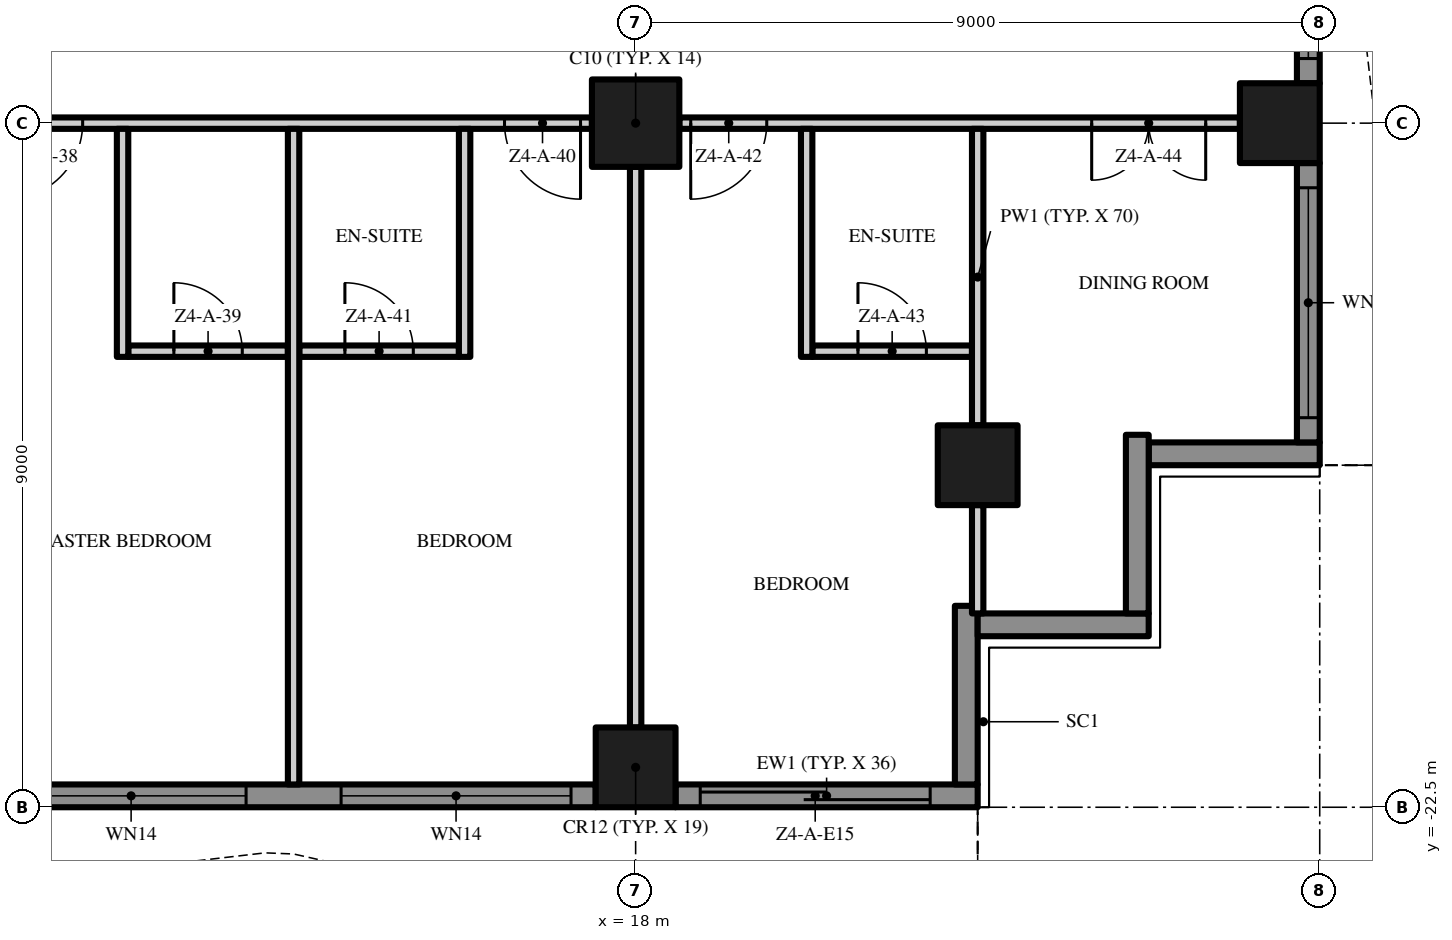
"""IFC4 building model, lengths in metres.
Left out: names, types, materials, properties, quantities, classifications, styles, units other than length and angle.
Written with IfcOpenShell. Run it as: python <this file> out.ifc"""

import sys

from ifc_helpers import new_model, si_unit, direction, frame, frame_2d, origin, origin_2d, place, context, subcontext, project, spatial, polyline, rectangle, outline, extrude, element, fill, save


model = new_model("IFC4")
c1 = context("Model", 3, precision=1e-05, world=origin(), true_north=direction((0.0, 1.0)))
c2 = subcontext(c1, "Body", "Model", "MODEL_VIEW")
j1 = project(units=[si_unit("LENGTHUNIT", "METRE"), si_unit("PLANEANGLEUNIT", "RADIAN")], contexts=[c1])
p1 = place(None, origin())
s1 = spatial("IfcSite", under=j1, at=p1, CompositionType="ELEMENT")
p2 = place(p1, origin())
s2 = spatial("IfcBuilding", under=s1, at=p2, CompositionType="ELEMENT")
p3 = place(p2, frame((0.0, 0.0, 192.0)))
s3 = spatial("IfcBuildingStorey", under=s2, at=p3, CompositionType="ELEMENT", Elevation=192.0)
p4 = place(p3, frame((18.0, -13.5, 0.0), z_axis=(0.0, 0.0, 1.0), x_axis=(1.0, 0.0, 0.0)))
e1 = element("IfcColumn", 1, at=p4, inside=s3, PredefinedType="COLUMN", context=c2, shape_type="SweptSolid", body=[
    extrude(rectangle(XDim=1.15, YDim=1.15, at=origin_2d()), origin(), (0.0, 0.0, 1.0), 3.5),
])
for number, where, z_axis, x_axis in (
    (2, (18.0, -21.975, 0.0), (0.0, 0.0, 1.0), (1.0, 0.0, 0.0)),
    (3, (26.475, -13.5, 0.0), (0.0, 0.0, 1.0), (1.0, 0.0, 0.0)),
    (4, (22.5, -18.0, 0.0), (0.0, 0.0, 1.0), (1.0, 0.0, 0.0)),
):
    element("IfcColumn", number, at=place(p3, frame(where, z_axis=z_axis, x_axis=x_axis)), inside=s3, PredefinedType="COLUMN", context=c2, shape_type="SweptSolid", body=[
        extrude(rectangle(XDim=1.05, YDim=1.05, at=origin_2d()), origin(), (0.0, 0.0, 1.0), 3.5),
    ])
p5 = place(p3, frame((17.475, -22.35, 0.0), z_axis=(0.0, 0.0, 1.0), x_axis=(-1.0, 0.0, 0.0)))
e5 = element("IfcWall", 5, at=p5, inside=s3, PredefinedType="SOLIDWALL", context=c2, shape_type="SweptSolid", body=[
    extrude(rectangle(XDim=7.95, YDim=0.3, at=frame_2d((3.975, 0.0))), origin(), (0.0, 0.0, 1.0), 3.5),
])
p6 = place(p5, frame((4.6, 0.0, 0.45)))
e6 = element("IfcOpeningElement", 6, at=p6, cuts=e5, PredefinedType="OPENING", context=c2, shape_type="SweptSolid", body=[
    extrude(rectangle(XDim=3.025, YDim=2.65, at=frame_2d((1.512, 1.325))), frame((0.0, 0.16, 0.0), z_axis=(0.0, -1.0, 0.0), x_axis=(1.0, 0.0, 0.0)), (0.0, 0.0, 1.0), 0.32),
])
p7 = place(p5, frame((0.325, 0.0, 0.45)))
e7 = element("IfcOpeningElement", 7, at=p7, cuts=e5, PredefinedType="OPENING", context=c2, shape_type="SweptSolid", body=[
    extrude(rectangle(XDim=3.025, YDim=2.65, at=frame_2d((1.512, 1.325))), frame((0.0, 0.16, 0.0), z_axis=(0.0, -1.0, 0.0), x_axis=(1.0, 0.0, 0.0)), (0.0, 0.0, 1.0), 0.32),
])
p8 = place(p3, frame((22.5, -22.35, 0.0), z_axis=(0.0, 0.0, 1.0), x_axis=(-1.0, 0.0, 0.0)))
e8 = element("IfcWall", 8, at=p8, inside=s3, PredefinedType="SOLIDWALL", context=c2, shape_type="SweptSolid", body=[
    extrude(rectangle(XDim=3.975, YDim=0.3, at=frame_2d((1.988, 0.0))), origin(), (0.0, 0.0, 1.0), 3.5),
])
p9 = place(p8, frame((0.625, 0.0, 0.0)))
e9 = element("IfcOpeningElement", 9, at=p9, cuts=e8, PredefinedType="OPENING", context=c2, shape_type="SweptSolid", body=[
    extrude(rectangle(XDim=3.025, YDim=2.4, at=frame_2d((1.512, 1.2))), frame((0.0, 0.16, 0.0), z_axis=(0.0, -1.0, 0.0), x_axis=(1.0, 0.0, 0.0)), (0.0, 0.0, 1.0), 0.32),
])
p10 = place(p3, frame((22.35, -19.85, 0.0), z_axis=(0.0, 0.0, 1.0), x_axis=(0.0, -1.0, 0.0)))
e10 = element("IfcWall", 10, at=p10, inside=s3, PredefinedType="SOLIDWALL", context=c2, shape_type="SweptSolid", body=[
    extrude(rectangle(XDim=2.35, YDim=0.3, at=frame_2d((1.175, 0.0))), origin(), (0.0, 0.0, 1.0), 3.5),
])
p11 = place(p3, frame((24.75, -20.1, 0.0), z_axis=(0.0, 0.0, 1.0), x_axis=(-1.0, 0.0, 0.0)))
e11 = element("IfcWall", 11, at=p11, inside=s3, PredefinedType="SOLIDWALL", context=c2, shape_type="SweptSolid", body=[
    extrude(rectangle(XDim=2.25, YDim=0.3, at=frame_2d((1.125, 0.0))), origin(), (0.0, 0.0, 1.0), 3.5),
])
p12 = place(p3, frame((24.6, -17.6, 0.0), z_axis=(0.0, 0.0, 1.0), x_axis=(0.0, -1.0, 0.0)))
e12 = element("IfcWall", 12, at=p12, inside=s3, PredefinedType="SOLIDWALL", context=c2, shape_type="SweptSolid", body=[
    extrude(rectangle(XDim=2.35, YDim=0.3, at=frame_2d((1.175, 0.0))), origin(), (0.0, 0.0, 1.0), 3.5),
])
p13 = place(p3, frame((27.0, -17.85, 0.0), z_axis=(0.0, 0.0, 1.0), x_axis=(-1.0, 0.0, 0.0)))
e13 = element("IfcWall", 13, at=p13, inside=s3, PredefinedType="SOLIDWALL", context=c2, shape_type="SweptSolid", body=[
    extrude(rectangle(XDim=2.25, YDim=0.3, at=frame_2d((1.125, 0.0))), origin(), (0.0, 0.0, 1.0), 3.5),
])
p14 = place(p3, frame((26.85, -14.025, 0.0), z_axis=(0.0, 0.0, 1.0), x_axis=(0.0, -1.0, 0.0)))
e14 = element("IfcWall", 14, at=p14, inside=s3, PredefinedType="SOLIDWALL", context=c2, shape_type="SweptSolid", body=[
    extrude(rectangle(XDim=3.675, YDim=0.3, at=frame_2d((1.837, 0.0))), origin(), (0.0, 0.0, 1.0), 3.5),
])
p15 = place(p14, frame((0.325, 0.0, 0.45)))
e15 = element("IfcOpeningElement", 15, at=p15, cuts=e14, PredefinedType="OPENING", context=c2, shape_type="SweptSolid", body=[
    extrude(rectangle(XDim=3.025, YDim=2.65, at=frame_2d((1.512, 1.325))), frame((0.0, 0.16, 0.0), z_axis=(0.0, -1.0, 0.0), x_axis=(1.0, 0.0, 0.0)), (0.0, 0.0, 1.0), 0.32),
])
p16 = place(p3, frame((26.85, -5.025, 0.0), z_axis=(0.0, 0.0, 1.0), x_axis=(0.0, -1.0, 0.0)))
e16 = element("IfcWall", 16, at=p16, inside=s3, PredefinedType="SOLIDWALL", context=c2, shape_type="SweptSolid", body=[
    extrude(rectangle(XDim=7.95, YDim=0.3, at=frame_2d((3.975, 0.0))), origin(), (0.0, 0.0, 1.0), 3.5),
])
p17 = place(p16, frame((4.6, 0.0, 0.45)))
e17 = element("IfcOpeningElement", 17, at=p17, cuts=e16, PredefinedType="OPENING", context=c2, shape_type="SweptSolid", body=[
    extrude(rectangle(XDim=3.025, YDim=2.65, at=frame_2d((1.512, 1.325))), frame((0.0, 0.16, 0.0), z_axis=(0.0, -1.0, 0.0), x_axis=(1.0, 0.0, 0.0)), (0.0, 0.0, 1.0), 0.32),
])
p18 = place(p16, frame((0.325, 0.0, 0.0)))
e18 = element("IfcOpeningElement", 18, at=p18, cuts=e16, PredefinedType="OPENING", context=c2, shape_type="SweptSolid", body=[
    extrude(rectangle(XDim=3.025, YDim=2.4, at=frame_2d((1.512, 1.2))), frame((0.0, 0.16, 0.0), z_axis=(0.0, -1.0, 0.0), x_axis=(1.0, 0.0, 0.0)), (0.0, 0.0, 1.0), 0.32),
])
p19 = place(p3, origin())
e19 = element("IfcWall", 19, at=p19, inside=s3, PredefinedType="USERDEFINED", context=c2, shape_type="SweptSolid", body=[
    extrude(outline(polyline([(-22.5, -25.149), (-21.0, -24.488), (-19.5, -23.755), (-18.0, -23.231), (-16.875, -23.1), (-16.5, -23.115), (-15.0, -23.451), (-13.5, -24.112), (-12.0, -24.845), (-10.5, -25.369), (-9.375, -25.5), (-9.0, -25.485), (-7.5, -25.149), (-6.0, -24.488), (-4.5, -23.755), (-3.0, -23.231), (-1.875, -23.1), (-1.5, -23.115), (0.0, -23.451), (1.5, -24.112), (3.0, -24.845), (4.5, -25.369), (5.625, -25.5), (6.0, -25.485), (7.5, -25.149), (9.0, -24.488), (10.5, -23.755), (12.0, -23.231), (13.125, -23.1), (13.5, -23.115), (15.0, -23.451), (16.5, -24.112), (18.0, -24.845), (19.5, -25.369), (20.625, -25.5), (21.0, -25.485), (22.5, -25.149), (22.445, -24.905), (20.967, -25.236), (20.635, -25.249), (19.556, -25.124), (18.096, -24.614), (16.605, -23.885), (15.079, -23.213), (13.533, -22.866), (13.115, -22.849), (11.944, -22.986), (10.404, -23.524), (8.895, -24.261), (7.421, -24.91), (5.967, -25.236), (5.635, -25.249), (4.556, -25.124), (3.096, -24.614), (1.605, -23.885), (0.079, -23.213), (-1.467, -22.866), (-1.885, -22.849), (-3.056, -22.986), (-4.596, -23.524), (-6.105, -24.261), (-7.579, -24.91), (-9.033, -25.236), (-9.365, -25.249), (-10.444, -25.124), (-11.904, -24.614), (-13.395, -23.885), (-14.921, -23.213), (-16.467, -22.866), (-16.885, -22.849), (-18.056, -22.986), (-19.596, -23.524), (-21.105, -24.261), (-22.601, -24.92), (-22.5, -25.149)])), origin(), (0.0, 0.0, 1.0), 0.9),
])
p20 = place(p3, origin())
e20 = element("IfcWall", 20, at=p20, inside=s3, PredefinedType="USERDEFINED", context=c2, shape_type="SweptSolid", body=[
    extrude(outline(polyline([(29.649, -18.0), (28.988, -16.5), (28.255, -15.0), (27.731, -13.5), (27.6, -12.375), (27.615, -12.0), (27.951, -10.5), (28.612, -9.0), (29.345, -7.5), (29.869, -6.0), (30.0, -4.875), (29.985, -4.5), (29.649, -3.0), (28.988, -1.5), (28.255, 0.0), (27.731, 1.5), (27.6, 2.625), (27.615, 3.0), (27.951, 4.5), (28.612, 6.0), (29.345, 7.5), (29.869, 9.0), (30.0, 10.125), (29.985, 10.5), (29.649, 12.0), (28.988, 13.5), (28.255, 15.0), (27.731, 16.5), (27.6, 17.625), (27.615, 18.0), (27.365, 18.01), (27.349, 17.615), (27.486, 16.444), (28.024, 14.904), (28.761, 13.395), (29.41, 11.921), (29.736, 10.467), (29.749, 10.135), (29.624, 9.056), (29.114, 7.596), (28.385, 6.105), (27.713, 4.579), (27.366, 3.033), (27.349, 2.615), (27.486, 1.444), (28.024, -0.096), (28.761, -1.605), (29.41, -3.079), (29.736, -4.533), (29.749, -4.865), (29.624, -5.944), (29.114, -7.404), (28.385, -8.895), (27.713, -10.421), (27.366, -11.967), (27.349, -12.385), (27.486, -13.556), (28.024, -15.096), (28.761, -16.605), (29.42, -18.101), (29.649, -18.0)])), origin(), (0.0, 0.0, 1.0), 0.9),
])
p21 = place(p3, frame((11.325, -16.5, 0.0), z_axis=(0.0, 0.0, 1.0), x_axis=(1.0, 0.0, 0.0)))
e21 = element("IfcWall", 21, at=p21, inside=s3, PredefinedType="PARTITIONING", context=c2, shape_type="SweptSolid", body=[
    extrude(rectangle(XDim=2.1, YDim=0.15, at=frame_2d((1.05, 0.0))), origin(), (0.0, 0.0, 1.0), 3.5),
])
p22 = place(p21, frame((0.6, 0.0, 0.0)))
e22 = element("IfcOpeningElement", 22, at=p22, cuts=e21, PredefinedType="OPENING", context=c2, shape_type="SweptSolid", body=[
    extrude(rectangle(XDim=0.9, YDim=2.1, at=frame_2d((0.45, 1.05))), frame((0.0, 0.085, 0.0), z_axis=(0.0, -1.0, 0.0), x_axis=(1.0, 0.0, 0.0)), (0.0, 0.0, 1.0), 0.17),
])
p23 = place(p3, frame((13.575, -16.5, 0.0), z_axis=(0.0, 0.0, 1.0), x_axis=(1.0, 0.0, 0.0)))
e23 = element("IfcWall", 23, at=p23, inside=s3, PredefinedType="PARTITIONING", context=c2, shape_type="SweptSolid", body=[
    extrude(rectangle(XDim=2.1, YDim=0.15, at=frame_2d((1.05, 0.0))), origin(), (0.0, 0.0, 1.0), 3.5),
])
p24 = place(p23, frame((0.6, 0.0, 0.0)))
e24 = element("IfcOpeningElement", 24, at=p24, cuts=e23, PredefinedType="OPENING", context=c2, shape_type="SweptSolid", body=[
    extrude(rectangle(XDim=0.9, YDim=2.1, at=frame_2d((0.45, 1.05))), frame((0.0, 0.085, 0.0), z_axis=(0.0, -1.0, 0.0), x_axis=(1.0, 0.0, 0.0)), (0.0, 0.0, 1.0), 0.17),
])
p25 = place(p3, frame((20.325, -16.5, 0.0), z_axis=(0.0, 0.0, 1.0), x_axis=(1.0, 0.0, 0.0)))
e25 = element("IfcWall", 25, at=p25, inside=s3, PredefinedType="PARTITIONING", context=c2, shape_type="SweptSolid", body=[
    extrude(rectangle(XDim=2.1, YDim=0.15, at=frame_2d((1.05, 0.0))), origin(), (0.0, 0.0, 1.0), 3.5),
])
p26 = place(p25, frame((0.6, 0.0, 0.0)))
e26 = element("IfcOpeningElement", 26, at=p26, cuts=e25, PredefinedType="OPENING", context=c2, shape_type="SweptSolid", body=[
    extrude(rectangle(XDim=0.9, YDim=2.1, at=frame_2d((0.45, 1.05))), frame((0.0, 0.085, 0.0), z_axis=(0.0, -1.0, 0.0), x_axis=(1.0, 0.0, 0.0)), (0.0, 0.0, 1.0), 0.17),
])
p27 = place(p3, frame((17.425, -13.5, 0.0), z_axis=(0.0, 0.0, 1.0), x_axis=(-1.0, 0.0, 0.0)))
e27 = element("IfcWall", 27, at=p27, inside=s3, PredefinedType="PARTITIONING", context=c2, shape_type="SweptSolid", body=[
    extrude(rectangle(XDim=7.85, YDim=0.15, at=frame_2d((3.925, 0.0))), origin(), (0.0, 0.0, 1.0), 3.5),
])
p28 = place(p27, frame((6.7, 0.0, 0.0)))
e28 = element("IfcOpeningElement", 28, at=p28, cuts=e27, PredefinedType="OPENING", context=c2, shape_type="SweptSolid", body=[
    extrude(rectangle(XDim=1.0, YDim=2.4, at=frame_2d((0.5, 1.2))), frame((0.0, 0.085, 0.0), z_axis=(0.0, -1.0, 0.0), x_axis=(1.0, 0.0, 0.0)), (0.0, 0.0, 1.0), 0.17),
])
p29 = place(p27, frame((0.15, 0.0, 0.0)))
e29 = element("IfcOpeningElement", 29, at=p29, cuts=e27, PredefinedType="OPENING", context=c2, shape_type="SweptSolid", body=[
    extrude(rectangle(XDim=1.0, YDim=2.4, at=frame_2d((0.5, 1.2))), frame((0.0, 0.085, 0.0), z_axis=(0.0, -1.0, 0.0), x_axis=(1.0, 0.0, 0.0)), (0.0, 0.0, 1.0), 0.17),
])
p30 = place(p3, frame((25.95, -13.5, 0.0), z_axis=(0.0, 0.0, 1.0), x_axis=(-1.0, 0.0, 0.0)))
e30 = element("IfcWall", 30, at=p30, inside=s3, PredefinedType="PARTITIONING", context=c2, shape_type="SweptSolid", body=[
    extrude(rectangle(XDim=7.375, YDim=0.15, at=frame_2d((3.688, 0.0))), origin(), (0.0, 0.0, 1.0), 3.5),
])
p31 = place(p30, frame((6.225, 0.0, 0.0)))
e31 = element("IfcOpeningElement", 31, at=p31, cuts=e30, PredefinedType="OPENING", context=c2, shape_type="SweptSolid", body=[
    extrude(rectangle(XDim=1.0, YDim=2.4, at=frame_2d((0.5, 1.2))), frame((0.0, 0.085, 0.0), z_axis=(0.0, -1.0, 0.0), x_axis=(1.0, 0.0, 0.0)), (0.0, 0.0, 1.0), 0.17),
])
p32 = place(p30, frame((0.45, 0.0, 0.0)))
e32 = element("IfcOpeningElement", 32, at=p32, cuts=e30, PredefinedType="OPENING", context=c2, shape_type="SweptSolid", body=[
    extrude(rectangle(XDim=1.5, YDim=2.4, at=frame_2d((0.75, 1.2))), frame((0.0, 0.085, 0.0), z_axis=(0.0, -1.0, 0.0), x_axis=(1.0, 0.0, 0.0)), (0.0, 0.0, 1.0), 0.17),
])
p33 = place(p3, frame((11.25, -16.575, 0.0), z_axis=(0.0, 0.0, 1.0), x_axis=(0.0, 1.0, 0.0)))
e33 = element("IfcWall", 33, at=p33, inside=s3, PredefinedType="PARTITIONING", context=c2, shape_type="SweptSolid", body=[
    extrude(rectangle(XDim=3.0, YDim=0.15, at=frame_2d((1.5, 0.0))), origin(), (0.0, 0.0, 1.0), 3.5),
])
p34 = place(p3, frame((13.5, -22.2, 0.0), z_axis=(0.0, 0.0, 1.0), x_axis=(0.0, 1.0, 0.0)))
e34 = element("IfcWall", 34, at=p34, inside=s3, PredefinedType="PARTITIONING", context=c2, shape_type="SweptSolid", body=[
    extrude(rectangle(XDim=8.625, YDim=0.15, at=frame_2d((4.312, 0.0))), origin(), (0.0, 0.0, 1.0), 3.5),
])
p35 = place(p3, frame((15.75, -16.575, 0.0), z_axis=(0.0, 0.0, 1.0), x_axis=(0.0, 1.0, 0.0)))
e35 = element("IfcWall", 35, at=p35, inside=s3, PredefinedType="PARTITIONING", context=c2, shape_type="SweptSolid", body=[
    extrude(rectangle(XDim=3.0, YDim=0.15, at=frame_2d((1.5, 0.0))), origin(), (0.0, 0.0, 1.0), 3.5),
])
p36 = place(p3, frame((18.0, -21.45, 0.0), z_axis=(0.0, 0.0, 1.0), x_axis=(0.0, 1.0, 0.0)))
e36 = element("IfcWall", 36, at=p36, inside=s3, PredefinedType="PARTITIONING", context=c2, shape_type="SweptSolid", body=[
    extrude(rectangle(XDim=7.375, YDim=0.15, at=frame_2d((3.688, 0.0))), origin(), (0.0, 0.0, 1.0), 3.5),
])
p37 = place(p3, frame((20.25, -16.575, 0.0), z_axis=(0.0, 0.0, 1.0), x_axis=(0.0, 1.0, 0.0)))
e37 = element("IfcWall", 37, at=p37, inside=s3, PredefinedType="PARTITIONING", context=c2, shape_type="SweptSolid", body=[
    extrude(rectangle(XDim=3.0, YDim=0.15, at=frame_2d((1.5, 0.0))), origin(), (0.0, 0.0, 1.0), 3.5),
])
p38 = place(p3, frame((22.5, -19.95, 0.0), z_axis=(0.0, 0.0, 1.0), x_axis=(0.0, 1.0, 0.0)))
e38 = element("IfcWall", 38, at=p38, inside=s3, PredefinedType="PARTITIONING", context=c2, shape_type="SweptSolid", body=[
    extrude(rectangle(XDim=1.425, YDim=0.15, at=frame_2d((0.713, 0.0))), origin(), (0.0, 0.0, 1.0), 3.5),
])
p39 = place(p3, frame((22.5, -17.475, 0.0), z_axis=(0.0, 0.0, 1.0), x_axis=(0.0, 1.0, 0.0)))
e39 = element("IfcWall", 39, at=p39, inside=s3, PredefinedType="PARTITIONING", context=c2, shape_type="SweptSolid", body=[
    extrude(rectangle(XDim=3.9, YDim=0.15, at=frame_2d((1.95, 0.0))), origin(), (0.0, 0.0, 1.0), 3.5),
])
p40 = place(p6, origin())
e40 = element("IfcWindow", 40, at=p40, inside=s3, PartitioningType="SINGLE_PANEL", PredefinedType="WINDOW", context=c2, shape_type="SweptSolid", body=[
    extrude(rectangle(XDim=3.025, YDim=2.65, at=frame_2d((1.512, 1.325))), frame((0.0, 0.03, 0.0), z_axis=(0.0, -1.0, 0.0), x_axis=(1.0, 0.0, 0.0)), (0.0, 0.0, 1.0), 0.06),
])
fill(e6, e40)
p41 = place(p7, origin())
e41 = element("IfcWindow", 41, at=p41, inside=s3, PartitioningType="SINGLE_PANEL", PredefinedType="WINDOW", context=c2, shape_type="SweptSolid", body=[
    extrude(rectangle(XDim=3.025, YDim=2.65, at=frame_2d((1.512, 1.325))), frame((0.0, 0.03, 0.0), z_axis=(0.0, -1.0, 0.0), x_axis=(1.0, 0.0, 0.0)), (0.0, 0.0, 1.0), 0.06),
])
fill(e7, e41)
p42 = place(p9, origin())
e42 = element("IfcDoor", 42, at=p42, inside=s3, OperationType="SINGLE_SWING_LEFT", PredefinedType="DOOR", context=c2, shape_type="SweptSolid", body=[
    extrude(rectangle(XDim=3.025, YDim=2.4, at=frame_2d((1.512, 1.2))), frame((0.0, 0.025, 0.0), z_axis=(0.0, -1.0, 0.0), x_axis=(1.0, 0.0, 0.0)), (0.0, 0.0, 1.0), 0.05),
])
fill(e9, e42)
p43 = place(p15, origin())
e43 = element("IfcWindow", 43, at=p43, inside=s3, PartitioningType="SINGLE_PANEL", PredefinedType="WINDOW", context=c2, shape_type="SweptSolid", body=[
    extrude(rectangle(XDim=3.025, YDim=2.65, at=frame_2d((1.512, 1.325))), frame((0.0, 0.03, 0.0), z_axis=(0.0, -1.0, 0.0), x_axis=(1.0, 0.0, 0.0)), (0.0, 0.0, 1.0), 0.06),
])
fill(e15, e43)
p44 = place(p17, origin())
e44 = element("IfcWindow", 44, at=p44, inside=s3, PartitioningType="SINGLE_PANEL", PredefinedType="WINDOW", context=c2, shape_type="SweptSolid", body=[
    extrude(rectangle(XDim=3.025, YDim=2.65, at=frame_2d((1.512, 1.325))), frame((0.0, 0.03, 0.0), z_axis=(0.0, -1.0, 0.0), x_axis=(1.0, 0.0, 0.0)), (0.0, 0.0, 1.0), 0.06),
])
fill(e17, e44)
p45 = place(p28, origin())
e45 = element("IfcDoor", 45, at=p45, inside=s3, OperationType="SINGLE_SWING_RIGHT", PredefinedType="DOOR", context=c2, shape_type="SweptSolid", body=[
    extrude(rectangle(XDim=1.0, YDim=2.4, at=frame_2d((0.5, 1.2))), frame((0.0, 0.025, 0.0), z_axis=(0.0, -1.0, 0.0), x_axis=(1.0, 0.0, 0.0)), (0.0, 0.0, 1.0), 0.05),
])
fill(e28, e45)
p46 = place(p22, origin())
e46 = element("IfcDoor", 46, at=p46, inside=s3, OperationType="SINGLE_SWING_LEFT", PredefinedType="DOOR", context=c2, shape_type="SweptSolid", body=[
    extrude(rectangle(XDim=0.9, YDim=2.1, at=frame_2d((0.45, 1.05))), frame((0.0, 0.025, 0.0), z_axis=(0.0, -1.0, 0.0), x_axis=(1.0, 0.0, 0.0)), (0.0, 0.0, 1.0), 0.05),
])
fill(e22, e46)
p47 = place(p29, origin())
e47 = element("IfcDoor", 47, at=p47, inside=s3, OperationType="SINGLE_SWING_LEFT", PredefinedType="DOOR", context=c2, shape_type="SweptSolid", body=[
    extrude(rectangle(XDim=1.0, YDim=2.4, at=frame_2d((0.5, 1.2))), frame((0.0, 0.025, 0.0), z_axis=(0.0, -1.0, 0.0), x_axis=(1.0, 0.0, 0.0)), (0.0, 0.0, 1.0), 0.05),
])
fill(e29, e47)
p48 = place(p24, origin())
e48 = element("IfcDoor", 48, at=p48, inside=s3, OperationType="SINGLE_SWING_LEFT", PredefinedType="DOOR", context=c2, shape_type="SweptSolid", body=[
    extrude(rectangle(XDim=0.9, YDim=2.1, at=frame_2d((0.45, 1.05))), frame((0.0, 0.025, 0.0), z_axis=(0.0, -1.0, 0.0), x_axis=(1.0, 0.0, 0.0)), (0.0, 0.0, 1.0), 0.05),
])
fill(e24, e48)
p49 = place(p31, origin())
e49 = element("IfcDoor", 49, at=p49, inside=s3, OperationType="SINGLE_SWING_RIGHT", PredefinedType="DOOR", context=c2, shape_type="SweptSolid", body=[
    extrude(rectangle(XDim=1.0, YDim=2.4, at=frame_2d((0.5, 1.2))), frame((0.0, 0.025, 0.0), z_axis=(0.0, -1.0, 0.0), x_axis=(1.0, 0.0, 0.0)), (0.0, 0.0, 1.0), 0.05),
])
fill(e31, e49)
p50 = place(p26, origin())
e50 = element("IfcDoor", 50, at=p50, inside=s3, OperationType="SINGLE_SWING_LEFT", PredefinedType="DOOR", context=c2, shape_type="SweptSolid", body=[
    extrude(rectangle(XDim=0.9, YDim=2.1, at=frame_2d((0.45, 1.05))), frame((0.0, 0.025, 0.0), z_axis=(0.0, -1.0, 0.0), x_axis=(1.0, 0.0, 0.0)), (0.0, 0.0, 1.0), 0.05),
])
fill(e26, e50)
p51 = place(p32, origin())
e51 = element("IfcDoor", 51, at=p51, inside=s3, OperationType="DOUBLE_DOOR_SINGLE_SWING", PredefinedType="DOOR", context=c2, shape_type="SweptSolid", body=[
    extrude(rectangle(XDim=1.5, YDim=2.4, at=frame_2d((0.75, 1.2))), frame((0.0, 0.025, 0.0), z_axis=(0.0, -1.0, 0.0), x_axis=(1.0, 0.0, 0.0)), (0.0, 0.0, 1.0), 0.05),
])
fill(e32, e51)
save(model, sys.argv[1])
